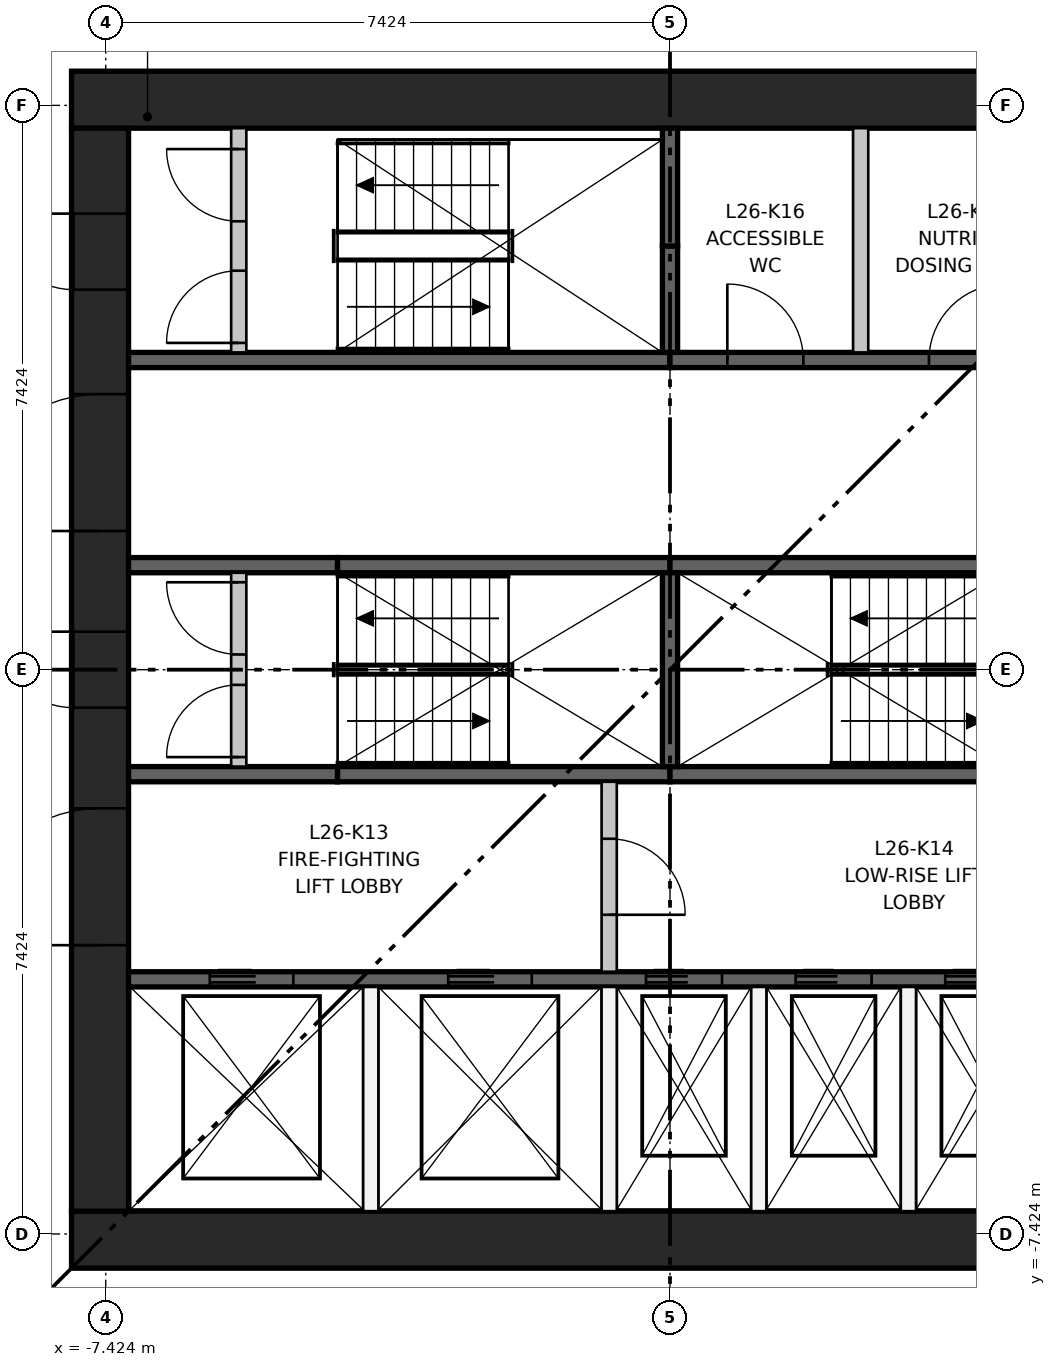
"""IFC4 building model, lengths in metres.
Left out: names, types, materials, properties, quantities, classifications, styles, units other than length and angle.
Written with IfcOpenShell. Run it as: python <this file> out.ifc"""

import sys

from ifc_helpers import new_model, si_unit, direction, frame, frame_2d, origin, place, context, subcontext, project, spatial, rectangle, extrude, element, fill, save


model = new_model("IFC4")
c1 = context("Model", 3, precision=1e-05, world=origin(), true_north=direction((0.0, 1.0)))
c2 = subcontext(c1, "Body", "Model", "MODEL_VIEW")
j1 = project(units=[si_unit("LENGTHUNIT", "METRE"), si_unit("PLANEANGLEUNIT", "RADIAN")], contexts=[c1])
p1 = place(None, origin())
s1 = spatial("IfcSite", under=j1, at=p1, CompositionType="ELEMENT")
p2 = place(p1, origin())
s2 = spatial("IfcBuilding", under=s1, at=p2, CompositionType="ELEMENT")
p3 = place(p2, frame((0.0, 0.0, 101.95)))
s3 = spatial("IfcBuildingStorey", under=s2, at=p3, CompositionType="ELEMENT", Elevation=101.95)
for number, where, z_axis, x_axis in (
    (1, (-7.874, -7.499, 0.0), (0.0, 0.0, 1.0), (1.0, 0.0, 0.0)),
    (2, (-7.874, 7.499, 0.0), (0.0, 0.0, 1.0), (1.0, 0.0, 0.0)),
):
    element("IfcWall", number, at=place(p3, frame(where, z_axis=z_axis, x_axis=x_axis)), inside=s3, PredefinedType="SHEAR", context=c2, shape_type="SweptSolid", body=[
        extrude(rectangle(XDim=15.748, YDim=0.75, at=frame_2d((7.874, 0.0))), origin(), (0.0, 0.0, 1.0), 3.65),
    ])
p4 = place(p3, frame((-7.499, -7.124, 0.0), z_axis=(0.0, 0.0, 1.0), x_axis=(0.0, 1.0, 0.0)))
e3 = element("IfcWall", 3, at=p4, inside=s3, PredefinedType="SHEAR", context=c2, shape_type="SweptSolid", body=[
    extrude(rectangle(XDim=14.248, YDim=0.75, at=frame_2d((7.124, 0.0))), origin(), (0.0, 0.0, 1.0), 3.65),
])
p5 = place(p4, frame((6.624, 0.0, 0.0)))
e4 = element("IfcOpeningElement", 4, at=p5, cuts=e3, PredefinedType="OPENING", context=c2, shape_type="SweptSolid", body=[
    extrude(rectangle(XDim=1.0, YDim=2.1, at=frame_2d((0.5, 1.05))), frame((0.0, 0.385, 0.0), z_axis=(0.0, -1.0, 0.0), x_axis=(1.0, 0.0, 0.0)), (0.0, 0.0, 1.0), 0.77),
])
p6 = place(p4, frame((3.5, 0.0, 0.0)))
e5 = element("IfcOpeningElement", 5, at=p6, cuts=e3, PredefinedType="OPENING", context=c2, shape_type="SweptSolid", body=[
    extrude(rectangle(XDim=1.8, YDim=2.1, at=frame_2d((0.9, 1.05))), frame((0.0, 0.385, 0.0), z_axis=(0.0, -1.0, 0.0), x_axis=(1.0, 0.0, 0.0)), (0.0, 0.0, 1.0), 0.77),
])
p7 = place(p4, frame((8.948, 0.0, 0.0)))
e6 = element("IfcOpeningElement", 6, at=p7, cuts=e3, PredefinedType="OPENING", context=c2, shape_type="SweptSolid", body=[
    extrude(rectangle(XDim=1.8, YDim=2.1, at=frame_2d((0.9, 1.05))), frame((0.0, 0.385, 0.0), z_axis=(0.0, -1.0, 0.0), x_axis=(1.0, 0.0, 0.0)), (0.0, 0.0, 1.0), 0.77),
])
p8 = place(p4, frame((12.124, 0.0, 0.0)))
e7 = element("IfcOpeningElement", 7, at=p8, cuts=e3, PredefinedType="OPENING", context=c2, shape_type="SweptSolid", body=[
    extrude(rectangle(XDim=1.0, YDim=2.1, at=frame_2d((0.5, 1.05))), frame((0.0, 0.385, 0.0), z_axis=(0.0, -1.0, 0.0), x_axis=(1.0, 0.0, 0.0)), (0.0, 0.0, 1.0), 0.77),
])
p9 = place(p3, frame((-7.124, -4.074, 0.0), z_axis=(0.0, 0.0, 1.0), x_axis=(1.0, 0.0, 0.0)))
e8 = element("IfcWall", 8, at=p9, inside=s3, PredefinedType="SHEAR", context=c2, shape_type="SweptSolid", body=[
    extrude(rectangle(XDim=14.248, YDim=0.2, at=frame_2d((7.124, 0.0))), origin(), (0.0, 0.0, 1.0), 3.3),
])
p10 = place(p9, frame((1.069, 0.0, 0.0)))
e9 = element("IfcOpeningElement", 9, at=p10, cuts=e8, PredefinedType="OPENING", context=c2, shape_type="SweptSolid", body=[
    extrude(rectangle(XDim=1.1, YDim=2.1, at=frame_2d((0.55, 1.05))), frame((0.0, 0.11, 0.0), z_axis=(0.0, -1.0, 0.0), x_axis=(1.0, 0.0, 0.0)), (0.0, 0.0, 1.0), 0.22),
])
p11 = place(p9, frame((4.206, 0.0, 0.0)))
e10 = element("IfcOpeningElement", 10, at=p11, cuts=e8, PredefinedType="OPENING", context=c2, shape_type="SweptSolid", body=[
    extrude(rectangle(XDim=1.1, YDim=2.1, at=frame_2d((0.55, 1.05))), frame((0.0, 0.11, 0.0), z_axis=(0.0, -1.0, 0.0), x_axis=(1.0, 0.0, 0.0)), (0.0, 0.0, 1.0), 0.22),
])
p12 = place(p9, frame((6.808, 0.0, 0.0)))
e11 = element("IfcOpeningElement", 11, at=p12, cuts=e8, PredefinedType="OPENING", context=c2, shape_type="SweptSolid", body=[
    extrude(rectangle(XDim=1.0, YDim=2.1, at=frame_2d((0.5, 1.05))), frame((0.0, 0.11, 0.0), z_axis=(0.0, -1.0, 0.0), x_axis=(1.0, 0.0, 0.0)), (0.0, 0.0, 1.0), 0.22),
])
p13 = place(p9, frame((8.777, 0.0, 0.0)))
e12 = element("IfcOpeningElement", 12, at=p13, cuts=e8, PredefinedType="OPENING", context=c2, shape_type="SweptSolid", body=[
    extrude(rectangle(XDim=1.0, YDim=2.1, at=frame_2d((0.5, 1.05))), frame((0.0, 0.11, 0.0), z_axis=(0.0, -1.0, 0.0), x_axis=(1.0, 0.0, 0.0)), (0.0, 0.0, 1.0), 0.22),
])
p14 = place(p9, frame((10.745, 0.0, 0.0)))
e13 = element("IfcOpeningElement", 13, at=p14, cuts=e8, PredefinedType="OPENING", context=c2, shape_type="SweptSolid", body=[
    extrude(rectangle(XDim=1.0, YDim=2.1, at=frame_2d((0.5, 1.05))), frame((0.0, 0.11, 0.0), z_axis=(0.0, -1.0, 0.0), x_axis=(1.0, 0.0, 0.0)), (0.0, 0.0, 1.0), 0.22),
])
p15 = place(p9, frame((12.714, 0.0, 0.0)))
e14 = element("IfcOpeningElement", 14, at=p15, cuts=e8, PredefinedType="OPENING", context=c2, shape_type="SweptSolid", body=[
    extrude(rectangle(XDim=1.0, YDim=2.1, at=frame_2d((0.5, 1.05))), frame((0.0, 0.11, 0.0), z_axis=(0.0, -1.0, 0.0), x_axis=(1.0, 0.0, 0.0)), (0.0, 0.0, 1.0), 0.22),
])
p16 = place(p3, frame((-7.124, 4.074, 0.0), z_axis=(0.0, 0.0, 1.0), x_axis=(1.0, 0.0, 0.0)))
e15 = element("IfcWall", 15, at=p16, inside=s3, PredefinedType="SHEAR", context=c2, shape_type="SweptSolid", body=[
    extrude(rectangle(XDim=7.124, YDim=0.2, at=frame_2d((3.562, 0.0))), origin(), (0.0, 0.0, 1.0), 3.3),
])
p17 = place(p3, frame((0.0, 4.074, 0.0), z_axis=(0.0, 0.0, 1.0), x_axis=(1.0, 0.0, 0.0)))
e16 = element("IfcWall", 16, at=p17, inside=s3, PredefinedType="SHEAR", context=c2, shape_type="SweptSolid", body=[
    extrude(rectangle(XDim=7.124, YDim=0.2, at=frame_2d((3.562, 0.0))), origin(), (0.0, 0.0, 1.0), 3.3),
])
p18 = place(p17, frame((0.754, 0.0, 0.0)))
e17 = element("IfcOpeningElement", 17, at=p18, cuts=e16, PredefinedType="OPENING", context=c2, shape_type="SweptSolid", body=[
    extrude(rectangle(XDim=1.0, YDim=2.1, at=frame_2d((0.5, 1.05))), frame((0.0, 0.11, 0.0), z_axis=(0.0, -1.0, 0.0), x_axis=(1.0, 0.0, 0.0)), (0.0, 0.0, 1.0), 0.22),
])
p19 = place(p17, frame((3.407, 0.0, 0.0)))
e18 = element("IfcOpeningElement", 18, at=p19, cuts=e16, PredefinedType="OPENING", context=c2, shape_type="SweptSolid", body=[
    extrude(rectangle(XDim=1.0, YDim=2.1, at=frame_2d((0.5, 1.05))), frame((0.0, 0.11, 0.0), z_axis=(0.0, -1.0, 0.0), x_axis=(1.0, 0.0, 0.0)), (0.0, 0.0, 1.0), 0.22),
])
p20 = place(p17, frame((5.79, 0.0, 0.0)))
e19 = element("IfcOpeningElement", 19, at=p20, cuts=e16, PredefinedType="OPENING", context=c2, shape_type="SweptSolid", body=[
    extrude(rectangle(XDim=0.8, YDim=2.1, at=frame_2d((0.4, 1.05))), frame((0.0, 0.11, 0.0), z_axis=(0.0, -1.0, 0.0), x_axis=(1.0, 0.0, 0.0)), (0.0, 0.0, 1.0), 0.22),
])
p21 = place(p3, frame((-7.124, -1.375, 0.0), z_axis=(0.0, 0.0, 1.0), x_axis=(1.0, 0.0, 0.0)))
e20 = element("IfcWall", 20, at=p21, inside=s3, PredefinedType="SHEAR", context=c2, shape_type="SweptSolid", body=[
    extrude(rectangle(XDim=2.75, YDim=0.2, at=frame_2d((1.375, 0.0))), origin(), (0.0, 0.0, 1.0), 3.3),
])
for number, where, z_axis, x_axis in (
    (21, (-4.374, -1.375, 0.0), (0.0, 0.0, 1.0), (1.0, 0.0, 0.0)),
    (22, (0.0, -1.375, 0.0), (0.0, 0.0, 1.0), (1.0, 0.0, 0.0)),
):
    element("IfcWall", number, at=place(p3, frame(where, z_axis=z_axis, x_axis=x_axis)), inside=s3, PredefinedType="SHEAR", context=c2, shape_type="SweptSolid", body=[
        extrude(rectangle(XDim=4.374, YDim=0.2, at=frame_2d((2.187, 0.0))), origin(), (0.0, 0.0, 1.0), 3.3),
    ])
p22 = place(p3, frame((-7.124, 1.375, 0.0), z_axis=(0.0, 0.0, 1.0), x_axis=(1.0, 0.0, 0.0)))
e23 = element("IfcWall", 23, at=p22, inside=s3, PredefinedType="SHEAR", context=c2, shape_type="SweptSolid", body=[
    extrude(rectangle(XDim=2.75, YDim=0.2, at=frame_2d((1.375, 0.0))), origin(), (0.0, 0.0, 1.0), 3.3),
])
for number, where, z_axis, x_axis in (
    (24, (-4.374, 1.375, 0.0), (0.0, 0.0, 1.0), (1.0, 0.0, 0.0)),
    (25, (0.0, 1.375, 0.0), (0.0, 0.0, 1.0), (1.0, 0.0, 0.0)),
):
    element("IfcWall", number, at=place(p3, frame(where, z_axis=z_axis, x_axis=x_axis)), inside=s3, PredefinedType="SHEAR", context=c2, shape_type="SweptSolid", body=[
        extrude(rectangle(XDim=4.374, YDim=0.2, at=frame_2d((2.187, 0.0))), origin(), (0.0, 0.0, 1.0), 3.3),
    ])
p23 = place(p3, frame((0.0, -1.275, 0.0), z_axis=(0.0, 0.0, 1.0), x_axis=(0.0, 1.0, 0.0)))
e26 = element("IfcWall", 26, at=p23, inside=s3, PredefinedType="SHEAR", context=c2, shape_type="SweptSolid", body=[
    extrude(rectangle(XDim=2.55, YDim=0.2, at=frame_2d((1.275, 0.0))), origin(), (0.0, 0.0, 1.0), 3.3),
])
for number, where, z_axis, x_axis in (
    (27, (-3.937, -7.124, 0.0), (0.0, 0.0, 1.0), (0.0, 1.0, 0.0)),
    (28, (-0.8, -7.124, 0.0), (0.0, 0.0, 1.0), (0.0, 1.0, 0.0)),
):
    element("IfcWall", number, at=place(p3, frame(where, z_axis=z_axis, x_axis=x_axis)), inside=s3, PredefinedType="PARTITIONING", context=c2, shape_type="SweptSolid", body=[
        extrude(rectangle(XDim=2.95, YDim=0.2, at=frame_2d((1.475, 0.0))), origin(), (0.0, 0.0, 1.0), 3.3),
    ])
p24 = place(p3, frame((-0.8, -3.974, 0.0), z_axis=(0.0, 0.0, 1.0), x_axis=(0.0, 1.0, 0.0)))
e29 = element("IfcWall", 29, at=p24, inside=s3, PredefinedType="PARTITIONING", context=c2, shape_type="SweptSolid", body=[
    extrude(rectangle(XDim=2.499, YDim=0.2, at=frame_2d((1.25, 0.0))), origin(), (0.0, 0.0, 1.0), 3.3),
])
p25 = place(p24, frame((0.75, 0.0, 0.0)))
e30 = element("IfcOpeningElement", 30, at=p25, cuts=e29, PredefinedType="OPENING", context=c2, shape_type="SweptSolid", body=[
    extrude(rectangle(XDim=1.0, YDim=2.1, at=frame_2d((0.5, 1.05))), frame((0.0, 0.11, 0.0), z_axis=(0.0, -1.0, 0.0), x_axis=(1.0, 0.0, 0.0)), (0.0, 0.0, 1.0), 0.22),
])
for number, where, z_axis, x_axis in (
    (31, (1.168, -7.124, 0.0), (0.0, 0.0, 1.0), (0.0, 1.0, 0.0)),
    (32, (3.137, -7.124, 0.0), (0.0, 0.0, 1.0), (0.0, 1.0, 0.0)),
):
    element("IfcWall", number, at=place(p3, frame(where, z_axis=z_axis, x_axis=x_axis)), inside=s3, PredefinedType="PARTITIONING", context=c2, shape_type="SweptSolid", body=[
        extrude(rectangle(XDim=2.95, YDim=0.2, at=frame_2d((1.475, 0.0))), origin(), (0.0, 0.0, 1.0), 3.3),
    ])
p26 = place(p3, frame((0.0, 4.174, 0.0), z_axis=(0.0, 0.0, 1.0), x_axis=(0.0, 1.0, 0.0)))
e33 = element("IfcWall", 33, at=p26, inside=s3, PredefinedType="SHEAR", context=c2, shape_type="SweptSolid", body=[
    extrude(rectangle(XDim=1.4, YDim=0.2, at=frame_2d((0.7, 0.0))), origin(), (0.0, 0.0, 1.0), 3.3),
])
p27 = place(p3, frame((0.0, 5.574, 0.0), z_axis=(0.0, 0.0, 1.0), x_axis=(0.0, 1.0, 0.0)))
e34 = element("IfcWall", 34, at=p27, inside=s3, PredefinedType="SHEAR", context=c2, shape_type="SweptSolid", body=[
    extrude(rectangle(XDim=1.55, YDim=0.2, at=frame_2d((0.775, 0.0))), origin(), (0.0, 0.0, 1.0), 3.3),
])
p28 = place(p3, frame((2.509, 4.174, 0.0), z_axis=(0.0, 0.0, 1.0), x_axis=(0.0, 1.0, 0.0)))
e35 = element("IfcWall", 35, at=p28, inside=s3, PredefinedType="PARTITIONING", context=c2, shape_type="SweptSolid", body=[
    extrude(rectangle(XDim=2.95, YDim=0.2, at=frame_2d((1.475, 0.0))), origin(), (0.0, 0.0, 1.0), 3.3),
])
p29 = place(p3, frame((-5.674, -1.275, 0.0), z_axis=(0.0, 0.0, 1.0), x_axis=(0.0, 1.0, 0.0)))
e36 = element("IfcWall", 36, at=p29, inside=s3, PredefinedType="PARTITIONING", context=c2, shape_type="SweptSolid", body=[
    extrude(rectangle(XDim=2.55, YDim=0.2, at=frame_2d((1.275, 0.0))), origin(), (0.0, 0.0, 1.0), 3.3),
])
p30 = place(p29, frame((0.125, 0.0, 0.0)))
e37 = element("IfcOpeningElement", 37, at=p30, cuts=e36, PredefinedType="OPENING", context=c2, shape_type="SweptSolid", body=[
    extrude(rectangle(XDim=0.95, YDim=2.1, at=frame_2d((0.475, 1.05))), frame((0.0, 0.11, 0.0), z_axis=(0.0, -1.0, 0.0), x_axis=(1.0, 0.0, 0.0)), (0.0, 0.0, 1.0), 0.22),
])
p31 = place(p29, frame((1.475, 0.0, 0.0)))
e38 = element("IfcOpeningElement", 38, at=p31, cuts=e36, PredefinedType="OPENING", context=c2, shape_type="SweptSolid", body=[
    extrude(rectangle(XDim=0.95, YDim=2.1, at=frame_2d((0.475, 1.05))), frame((0.0, 0.11, 0.0), z_axis=(0.0, -1.0, 0.0), x_axis=(1.0, 0.0, 0.0)), (0.0, 0.0, 1.0), 0.22),
])
p32 = place(p3, frame((-5.674, 4.174, 0.0), z_axis=(0.0, 0.0, 1.0), x_axis=(0.0, 1.0, 0.0)))
e39 = element("IfcWall", 39, at=p32, inside=s3, PredefinedType="PARTITIONING", context=c2, shape_type="SweptSolid", body=[
    extrude(rectangle(XDim=2.95, YDim=0.2, at=frame_2d((1.475, 0.0))), origin(), (0.0, 0.0, 1.0), 3.3),
])
p33 = place(p32, frame((0.125, 0.0, 0.0)))
e40 = element("IfcOpeningElement", 40, at=p33, cuts=e39, PredefinedType="OPENING", context=c2, shape_type="SweptSolid", body=[
    extrude(rectangle(XDim=0.95, YDim=2.1, at=frame_2d((0.475, 1.05))), frame((0.0, 0.11, 0.0), z_axis=(0.0, -1.0, 0.0), x_axis=(1.0, 0.0, 0.0)), (0.0, 0.0, 1.0), 0.22),
])
p34 = place(p32, frame((1.725, 0.0, 0.0)))
e41 = element("IfcOpeningElement", 41, at=p34, cuts=e39, PredefinedType="OPENING", context=c2, shape_type="SweptSolid", body=[
    extrude(rectangle(XDim=0.95, YDim=2.1, at=frame_2d((0.475, 1.05))), frame((0.0, 0.11, 0.0), z_axis=(0.0, -1.0, 0.0), x_axis=(1.0, 0.0, 0.0)), (0.0, 0.0, 1.0), 0.22),
])
p35 = place(p10, origin())
e42 = element("IfcDoor", 42, at=p35, inside=s3, OperationType="DOUBLE_DOOR_SLIDING", PredefinedType="DOOR", context=c2, shape_type="SweptSolid", body=[
    extrude(rectangle(XDim=1.1, YDim=2.1, at=frame_2d((0.55, 1.05))), frame((0.0, 0.025, 0.0), z_axis=(0.0, -1.0, 0.0), x_axis=(1.0, 0.0, 0.0)), (0.0, 0.0, 1.0), 0.05),
])
fill(e9, e42)
p36 = place(p11, origin())
e43 = element("IfcDoor", 43, at=p36, inside=s3, OperationType="DOUBLE_DOOR_SLIDING", PredefinedType="DOOR", context=c2, shape_type="SweptSolid", body=[
    extrude(rectangle(XDim=1.1, YDim=2.1, at=frame_2d((0.55, 1.05))), frame((0.0, 0.025, 0.0), z_axis=(0.0, -1.0, 0.0), x_axis=(1.0, 0.0, 0.0)), (0.0, 0.0, 1.0), 0.05),
])
fill(e10, e43)
p37 = place(p12, origin())
e44 = element("IfcDoor", 44, at=p37, inside=s3, OperationType="DOUBLE_DOOR_SLIDING", PredefinedType="DOOR", context=c2, shape_type="SweptSolid", body=[
    extrude(rectangle(XDim=1.0, YDim=2.1, at=frame_2d((0.5, 1.05))), frame((0.0, 0.025, 0.0), z_axis=(0.0, -1.0, 0.0), x_axis=(1.0, 0.0, 0.0)), (0.0, 0.0, 1.0), 0.05),
])
fill(e11, e44)
p38 = place(p13, origin())
e45 = element("IfcDoor", 45, at=p38, inside=s3, OperationType="DOUBLE_DOOR_SLIDING", PredefinedType="DOOR", context=c2, shape_type="SweptSolid", body=[
    extrude(rectangle(XDim=1.0, YDim=2.1, at=frame_2d((0.5, 1.05))), frame((0.0, 0.025, 0.0), z_axis=(0.0, -1.0, 0.0), x_axis=(1.0, 0.0, 0.0)), (0.0, 0.0, 1.0), 0.05),
])
fill(e12, e45)
p39 = place(p14, origin())
e46 = element("IfcDoor", 46, at=p39, inside=s3, OperationType="DOUBLE_DOOR_SLIDING", PredefinedType="DOOR", context=c2, shape_type="SweptSolid", body=[
    extrude(rectangle(XDim=1.0, YDim=2.1, at=frame_2d((0.5, 1.05))), frame((0.0, 0.025, 0.0), z_axis=(0.0, -1.0, 0.0), x_axis=(1.0, 0.0, 0.0)), (0.0, 0.0, 1.0), 0.05),
])
fill(e13, e46)
p40 = place(p30, origin())
e47 = element("IfcDoor", 47, at=p40, inside=s3, OperationType="SINGLE_SWING_LEFT", PredefinedType="DOOR", context=c2, shape_type="SweptSolid", body=[
    extrude(rectangle(XDim=0.95, YDim=2.1, at=frame_2d((0.475, 1.05))), frame((0.0, 0.025, 0.0), z_axis=(0.0, -1.0, 0.0), x_axis=(1.0, 0.0, 0.0)), (0.0, 0.0, 1.0), 0.05),
])
fill(e37, e47)
p41 = place(p31, origin())
e48 = element("IfcDoor", 48, at=p41, inside=s3, OperationType="SINGLE_SWING_RIGHT", PredefinedType="DOOR", context=c2, shape_type="SweptSolid", body=[
    extrude(rectangle(XDim=0.95, YDim=2.1, at=frame_2d((0.475, 1.05))), frame((0.0, 0.025, 0.0), z_axis=(0.0, -1.0, 0.0), x_axis=(1.0, 0.0, 0.0)), (0.0, 0.0, 1.0), 0.05),
])
fill(e38, e48)
p42 = place(p33, origin())
e49 = element("IfcDoor", 49, at=p42, inside=s3, OperationType="SINGLE_SWING_LEFT", PredefinedType="DOOR", context=c2, shape_type="SweptSolid", body=[
    extrude(rectangle(XDim=0.95, YDim=2.1, at=frame_2d((0.475, 1.05))), frame((0.0, 0.025, 0.0), z_axis=(0.0, -1.0, 0.0), x_axis=(1.0, 0.0, 0.0)), (0.0, 0.0, 1.0), 0.05),
])
fill(e40, e49)
p43 = place(p34, origin())
e50 = element("IfcDoor", 50, at=p43, inside=s3, OperationType="SINGLE_SWING_RIGHT", PredefinedType="DOOR", context=c2, shape_type="SweptSolid", body=[
    extrude(rectangle(XDim=0.95, YDim=2.1, at=frame_2d((0.475, 1.05))), frame((0.0, 0.025, 0.0), z_axis=(0.0, -1.0, 0.0), x_axis=(1.0, 0.0, 0.0)), (0.0, 0.0, 1.0), 0.05),
])
fill(e41, e50)
p44 = place(p25, frame((1.0, 0.0, 0.0), z_axis=(0.0, 0.0, 1.0), x_axis=(-1.0, 0.0, 0.0)))
e51 = element("IfcDoor", 51, at=p44, inside=s3, OperationType="SINGLE_SWING_LEFT", PredefinedType="DOOR", context=c2, shape_type="SweptSolid", body=[
    extrude(rectangle(XDim=1.0, YDim=2.1, at=frame_2d((0.5, 1.05))), frame((0.0, 0.025, 0.0), z_axis=(0.0, -1.0, 0.0), x_axis=(1.0, 0.0, 0.0)), (0.0, 0.0, 1.0), 0.05),
])
fill(e30, e51)
p45 = place(p18, origin())
e52 = element("IfcDoor", 52, at=p45, inside=s3, OperationType="SINGLE_SWING_LEFT", PredefinedType="DOOR", context=c2, shape_type="SweptSolid", body=[
    extrude(rectangle(XDim=1.0, YDim=2.1, at=frame_2d((0.5, 1.05))), frame((0.0, 0.025, 0.0), z_axis=(0.0, -1.0, 0.0), x_axis=(1.0, 0.0, 0.0)), (0.0, 0.0, 1.0), 0.05),
])
fill(e17, e52)
p46 = place(p19, origin())
e53 = element("IfcDoor", 53, at=p46, inside=s3, OperationType="SINGLE_SWING_RIGHT", PredefinedType="DOOR", context=c2, shape_type="SweptSolid", body=[
    extrude(rectangle(XDim=1.0, YDim=2.1, at=frame_2d((0.5, 1.05))), frame((0.0, 0.025, 0.0), z_axis=(0.0, -1.0, 0.0), x_axis=(1.0, 0.0, 0.0)), (0.0, 0.0, 1.0), 0.05),
])
fill(e18, e53)
p47 = place(p5, origin())
e54 = element("IfcDoor", 54, at=p47, inside=s3, OperationType="SINGLE_SWING_RIGHT", PredefinedType="DOOR", context=c2, shape_type="SweptSolid", body=[
    extrude(rectangle(XDim=1.0, YDim=2.1, at=frame_2d((0.5, 1.05))), frame((0.0, 0.375, 0.0), z_axis=(0.0, -1.0, 0.0), x_axis=(1.0, 0.0, 0.0)), (0.0, 0.0, 1.0), 0.05),
])
fill(e4, e54)
p48 = place(p6, origin())
e55 = element("IfcDoor", 55, at=p48, inside=s3, OperationType="DOUBLE_DOOR_SINGLE_SWING", PredefinedType="DOOR", context=c2, shape_type="SweptSolid", body=[
    extrude(rectangle(XDim=1.8, YDim=2.1, at=frame_2d((0.9, 1.05))), frame((0.0, 0.025, 0.0), z_axis=(0.0, -1.0, 0.0), x_axis=(1.0, 0.0, 0.0)), (0.0, 0.0, 1.0), 0.05),
])
fill(e5, e55)
p49 = place(p7, origin())
e56 = element("IfcDoor", 56, at=p49, inside=s3, OperationType="DOUBLE_DOOR_SINGLE_SWING", PredefinedType="DOOR", context=c2, shape_type="SweptSolid", body=[
    extrude(rectangle(XDim=1.8, YDim=2.1, at=frame_2d((0.9, 1.05))), frame((0.0, 0.025, 0.0), z_axis=(0.0, -1.0, 0.0), x_axis=(1.0, 0.0, 0.0)), (0.0, 0.0, 1.0), 0.05),
])
fill(e6, e56)
p50 = place(p8, origin())
e57 = element("IfcDoor", 57, at=p50, inside=s3, OperationType="SINGLE_SWING_RIGHT", PredefinedType="DOOR", context=c2, shape_type="SweptSolid", body=[
    extrude(rectangle(XDim=1.0, YDim=2.1, at=frame_2d((0.5, 1.05))), frame((0.0, 0.375, 0.0), z_axis=(0.0, -1.0, 0.0), x_axis=(1.0, 0.0, 0.0)), (0.0, 0.0, 1.0), 0.05),
])
fill(e7, e57)
save(model, sys.argv[1])
